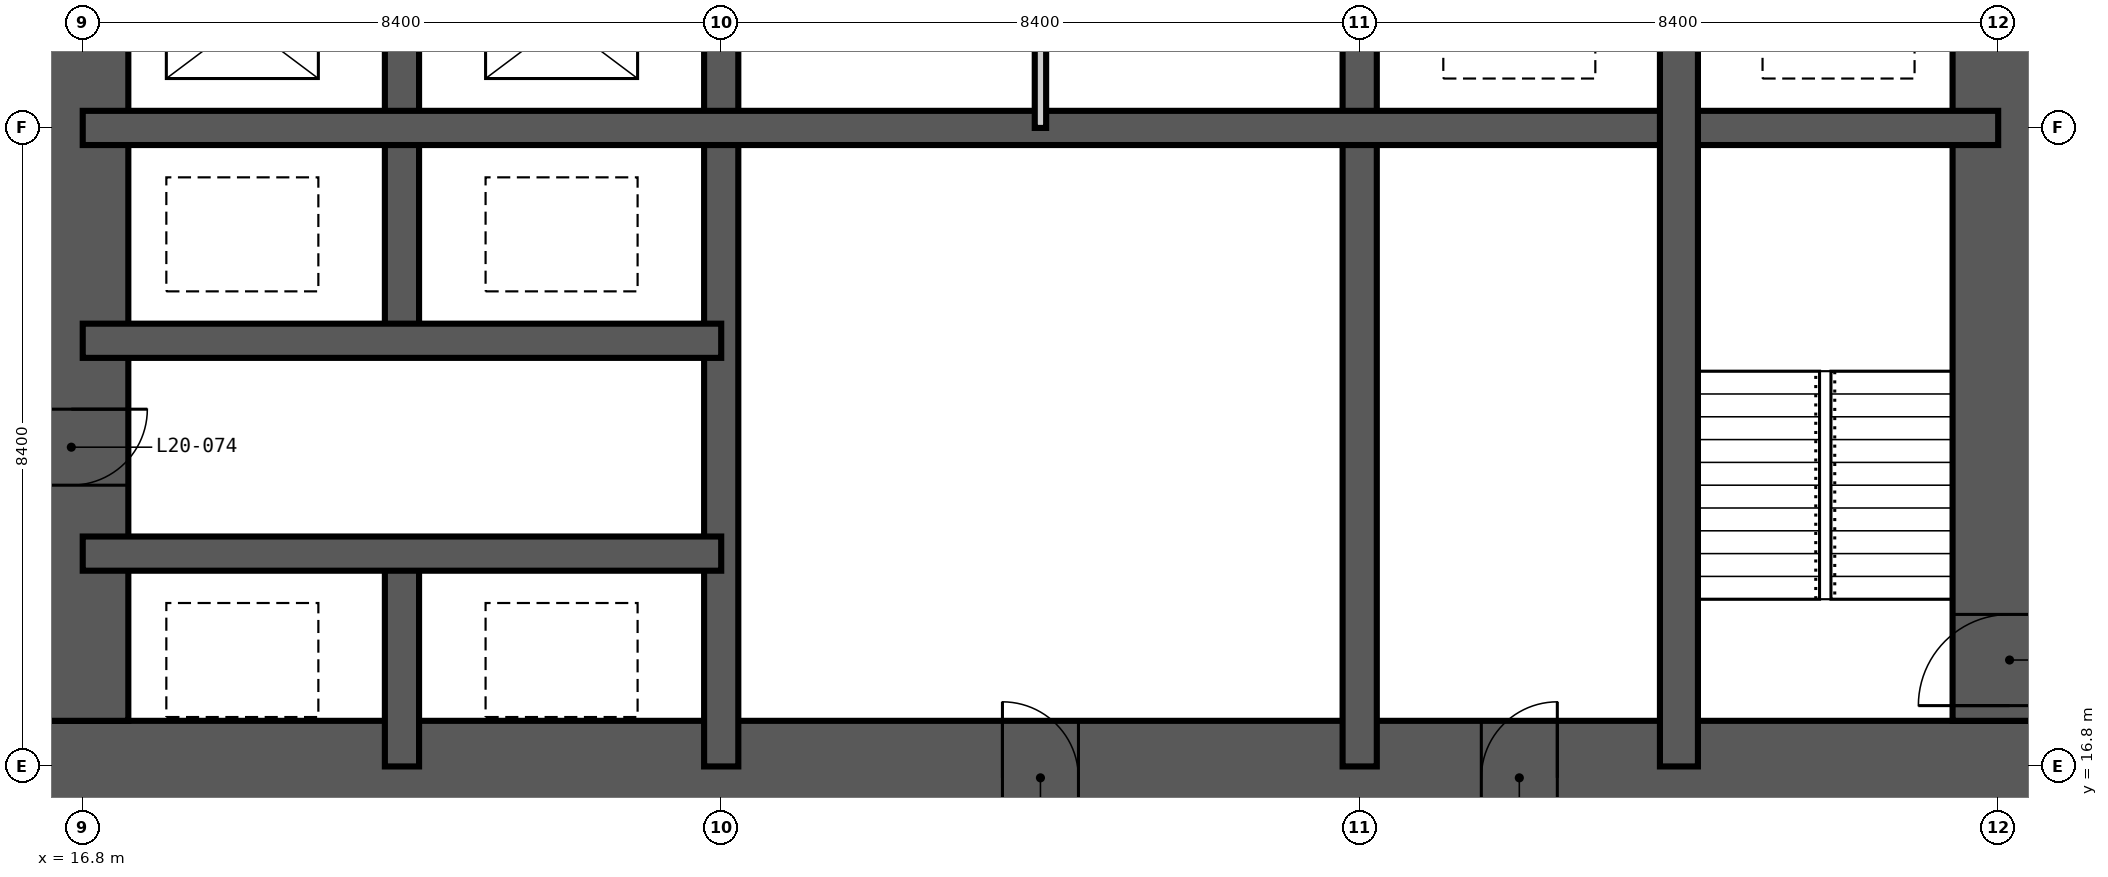
"""IFC4 building model, lengths in metres.
Left out: names, types, materials, properties, quantities, classifications, styles, units other than length and angle.
Written with IfcOpenShell. Run it as: python <this file> out.ifc"""

import sys

from ifc_helpers import new_model, si_unit, direction, frame, frame_2d, origin, place, context, subcontext, project, spatial, rectangle, extrude, element, fill, save


model = new_model("IFC4")
c1 = context("Model", 3, precision=1e-05, world=origin(), true_north=direction((0.0, 1.0)))
c2 = subcontext(c1, "Body", "Model", "MODEL_VIEW")
j1 = project(units=[si_unit("LENGTHUNIT", "METRE"), si_unit("PLANEANGLEUNIT", "RADIAN")], contexts=[c1])
p1 = place(None, origin())
s1 = spatial("IfcSite", under=j1, at=p1, CompositionType="ELEMENT")
p2 = place(p1, origin())
s2 = spatial("IfcBuilding", under=s1, at=p2, CompositionType="ELEMENT")
p3 = place(p2, frame((0.0, 0.0, 81.0)))
s3 = spatial("IfcBuildingStorey", under=s2, at=p3, CompositionType="ELEMENT", Elevation=81.0)
p4 = place(p3, frame((15.9, 16.65, -0.35), z_axis=(0.0, 0.0, 1.0), x_axis=(1.0, 0.0, 0.0)))
e1 = element("IfcWall", 1, at=p4, inside=s3, PredefinedType="SHEAR", context=c2, shape_type="SweptSolid", body=[
    extrude(rectangle(XDim=27.0, YDim=1.5, at=frame_2d((13.5, 0.0))), origin(), (0.0, 0.0, 1.0), 3.6),
])
p5 = place(p4, frame((13.0, 0.0, 0.35)))
e2 = element("IfcOpeningElement", 2, at=p5, cuts=e1, PredefinedType="OPENING", context=c2, shape_type="SweptSolid", body=[
    extrude(rectangle(XDim=1.0, YDim=2.1, at=frame_2d((0.5, 1.05))), frame((0.0, 0.76, 0.0), z_axis=(0.0, -1.0, 0.0), x_axis=(1.0, 0.0, 0.0)), (0.0, 0.0, 1.0), 1.52),
])
p6 = place(p4, frame((19.3, 0.0, 0.35)))
e3 = element("IfcOpeningElement", 3, at=p6, cuts=e1, PredefinedType="OPENING", context=c2, shape_type="SweptSolid", body=[
    extrude(rectangle(XDim=1.0, YDim=2.1, at=frame_2d((0.5, 1.05))), frame((0.0, 0.76, 0.0), z_axis=(0.0, -1.0, 0.0), x_axis=(1.0, 0.0, 0.0)), (0.0, 0.0, 1.0), 1.52),
])
p7 = place(p3, frame((42.15, 17.4, -0.35), z_axis=(0.0, 0.0, 1.0), x_axis=(0.0, 1.0, 0.0)))
e4 = element("IfcWall", 4, at=p7, inside=s3, PredefinedType="SHEAR", context=c2, shape_type="SweptSolid", body=[
    extrude(rectangle(XDim=24.0, YDim=1.5, at=frame_2d((12.0, 0.0))), origin(), (0.0, 0.0, 1.0), 3.6),
])
p8 = place(p7, frame((0.2, 0.0, 0.35)))
e5 = element("IfcOpeningElement", 5, at=p8, cuts=e4, PredefinedType="OPENING", context=c2, shape_type="SweptSolid", body=[
    extrude(rectangle(XDim=1.2, YDim=2.2, at=frame_2d((0.6, 1.1))), frame((0.0, 0.76, 0.0), z_axis=(0.0, -1.0, 0.0), x_axis=(1.0, 0.0, 0.0)), (0.0, 0.0, 1.0), 1.52),
])
p9 = place(p7, frame((11.5, 0.0, 0.35)))
e6 = element("IfcOpeningElement", 6, at=p9, cuts=e4, PredefinedType="OPENING", context=c2, shape_type="SweptSolid", body=[
    extrude(rectangle(XDim=1.0, YDim=2.1, at=frame_2d((0.5, 1.05))), frame((0.0, 0.76, 0.0), z_axis=(0.0, -1.0, 0.0), x_axis=(1.0, 0.0, 0.0)), (0.0, 0.0, 1.0), 1.52),
])
p10 = place(p7, frame((19.9, 0.0, 0.35)))
e7 = element("IfcOpeningElement", 7, at=p10, cuts=e4, PredefinedType="OPENING", context=c2, shape_type="SweptSolid", body=[
    extrude(rectangle(XDim=1.0, YDim=2.1, at=frame_2d((0.5, 1.05))), frame((0.0, 0.76, 0.0), z_axis=(0.0, -1.0, 0.0), x_axis=(1.0, 0.0, 0.0)), (0.0, 0.0, 1.0), 1.52),
])
p11 = place(p3, frame((16.65, 41.4, -0.35), z_axis=(0.0, 0.0, 1.0), x_axis=(0.0, -1.0, 0.0)))
e8 = element("IfcWall", 8, at=p11, inside=s3, PredefinedType="SHEAR", context=c2, shape_type="SweptSolid", body=[
    extrude(rectangle(XDim=24.0, YDim=1.5, at=frame_2d((12.0, 0.0))), origin(), (0.0, 0.0, 1.0), 3.6),
])
p12 = place(p11, frame((11.1, 0.0, 0.35)))
e9 = element("IfcOpeningElement", 9, at=p12, cuts=e8, PredefinedType="OPENING", context=c2, shape_type="SweptSolid", body=[
    extrude(rectangle(XDim=1.8, YDim=2.2, at=frame_2d((0.9, 1.1))), frame((0.0, 0.76, 0.0), z_axis=(0.0, -1.0, 0.0), x_axis=(1.0, 0.0, 0.0)), (0.0, 0.0, 1.0), 1.52),
])
p13 = place(p11, frame((19.9, 0.0, 0.35)))
e10 = element("IfcOpeningElement", 10, at=p13, cuts=e8, PredefinedType="OPENING", context=c2, shape_type="SweptSolid", body=[
    extrude(rectangle(XDim=1.0, YDim=2.1, at=frame_2d((0.5, 1.05))), frame((0.0, 0.76, 0.0), z_axis=(0.0, -1.0, 0.0), x_axis=(1.0, 0.0, 0.0)), (0.0, 0.0, 1.0), 1.52),
])
p14 = place(p11, frame((5.2, 0.0, 0.35)))
e11 = element("IfcOpeningElement", 11, at=p14, cuts=e8, PredefinedType="OPENING", context=c2, shape_type="SweptSolid", body=[
    extrude(rectangle(XDim=1.0, YDim=2.1, at=frame_2d((0.5, 1.05))), frame((0.0, 0.76, 0.0), z_axis=(0.0, -1.0, 0.0), x_axis=(1.0, 0.0, 0.0)), (0.0, 0.0, 1.0), 1.52),
])
p15 = place(p3, frame((21.0, 16.8, -0.35), z_axis=(0.0, 0.0, 1.0), x_axis=(0.0, 1.0, 0.0)))
e12 = element("IfcWall", 12, at=p15, inside=s3, PredefinedType="SHEAR", context=c2, shape_type="SweptSolid", body=[
    extrude(rectangle(XDim=2.8, YDim=0.45, at=frame_2d((1.4, 0.0))), origin(), (0.0, 0.0, 1.0), 3.6),
])
p16 = place(p3, frame((21.0, 22.4, -0.35), z_axis=(0.0, 0.0, 1.0), x_axis=(0.0, 1.0, 0.0)))
e13 = element("IfcWall", 13, at=p16, inside=s3, PredefinedType="SHEAR", context=c2, shape_type="SweptSolid", body=[
    extrude(rectangle(XDim=5.6, YDim=0.45, at=frame_2d((2.8, 0.0))), origin(), (0.0, 0.0, 1.0), 3.6),
])
p17 = place(p3, frame((25.2, 16.8, -0.35), z_axis=(0.0, 0.0, 1.0), x_axis=(0.0, 1.0, 0.0)))
e14 = element("IfcWall", 14, at=p17, inside=s3, PredefinedType="SHEAR", context=c2, shape_type="SweptSolid", body=[
    extrude(rectangle(XDim=25.2, YDim=0.45, at=frame_2d((12.6, 0.0))), origin(), (0.0, 0.0, 1.0), 3.6),
])
p18 = place(p3, frame((33.6, 16.8, -0.35), z_axis=(0.0, 0.0, 1.0), x_axis=(0.0, 1.0, 0.0)))
e15 = element("IfcWall", 15, at=p18, inside=s3, PredefinedType="SHEAR", context=c2, shape_type="SweptSolid", body=[
    extrude(rectangle(XDim=25.2, YDim=0.45, at=frame_2d((12.6, 0.0))), origin(), (0.0, 0.0, 1.0), 3.6),
])
p19 = place(p18, frame((22.5, 0.0, 0.35)))
e16 = element("IfcOpeningElement", 16, at=p19, cuts=e15, PredefinedType="OPENING", context=c2, shape_type="SweptSolid", body=[
    extrude(rectangle(XDim=1.2, YDim=2.2, at=frame_2d((0.6, 1.1))), frame((0.0, 0.235, 0.0), z_axis=(0.0, -1.0, 0.0), x_axis=(1.0, 0.0, 0.0)), (0.0, 0.0, 1.0), 0.47),
])
p20 = place(p18, frame((18.3, 0.0, 0.35)))
e17 = element("IfcOpeningElement", 17, at=p20, cuts=e15, PredefinedType="OPENING", context=c2, shape_type="SweptSolid", body=[
    extrude(rectangle(XDim=1.2, YDim=2.2, at=frame_2d((0.6, 1.1))), frame((0.0, 0.235, 0.0), z_axis=(0.0, -1.0, 0.0), x_axis=(1.0, 0.0, 0.0)), (0.0, 0.0, 1.0), 0.47),
])
p21 = place(p18, frame((12.1, 0.0, 0.35)))
e18 = element("IfcOpeningElement", 18, at=p21, cuts=e15, PredefinedType="OPENING", context=c2, shape_type="SweptSolid", body=[
    extrude(rectangle(XDim=1.0, YDim=2.1, at=frame_2d((0.5, 1.05))), frame((0.0, 0.235, 0.0), z_axis=(0.0, -1.0, 0.0), x_axis=(1.0, 0.0, 0.0)), (0.0, 0.0, 1.0), 0.47),
])
for number, where, z_axis, x_axis in (
    (19, (16.8, 19.6, -0.35), (0.0, 0.0, 1.0), (1.0, 0.0, 0.0)),
    (20, (16.8, 22.4, -0.35), (0.0, 0.0, 1.0), (1.0, 0.0, 0.0)),
):
    element("IfcWall", number, at=place(p3, frame(where, z_axis=z_axis, x_axis=x_axis)), inside=s3, PredefinedType="SHEAR", context=c2, shape_type="SweptSolid", body=[
        extrude(rectangle(XDim=8.4, YDim=0.45, at=frame_2d((4.2, 0.0))), origin(), (0.0, 0.0, 1.0), 3.6),
    ])
p22 = place(p3, frame((16.8, 25.2, -0.35), z_axis=(0.0, 0.0, 1.0), x_axis=(1.0, 0.0, 0.0)))
e21 = element("IfcWall", 21, at=p22, inside=s3, PredefinedType="SHEAR", context=c2, shape_type="SweptSolid", body=[
    extrude(rectangle(XDim=25.2, YDim=0.45, at=frame_2d((12.6, 0.0))), origin(), (0.0, 0.0, 1.0), 3.6),
])
p23 = place(p3, frame((37.8, 16.8, -0.35), z_axis=(0.0, 0.0, 1.0), x_axis=(0.0, 1.0, 0.0)))
e22 = element("IfcWall", 22, at=p23, inside=s3, PredefinedType="SHEAR", context=c2, shape_type="SweptSolid", body=[
    extrude(rectangle(XDim=11.2, YDim=0.5, at=frame_2d((5.6, 0.0))), origin(), (0.0, 0.0, 1.0), 3.6),
])
p24 = place(p3, frame((29.4, 25.2, 0.0), z_axis=(0.0, 0.0, 1.0), x_axis=(0.0, 1.0, 0.0)))
e23 = element("IfcWall", 23, at=p24, inside=s3, PredefinedType="PARTITIONING", context=c2, shape_type="SweptSolid", body=[
    extrude(rectangle(XDim=8.4, YDim=0.15, at=frame_2d((4.2, 0.0))), origin(), (0.0, 0.0, 1.0), 3.25),
])
p25 = place(p24, frame((3.7, 0.0, 0.0)))
e24 = element("IfcOpeningElement", 24, at=p25, cuts=e23, PredefinedType="OPENING", context=c2, shape_type="SweptSolid", body=[
    extrude(rectangle(XDim=1.0, YDim=2.1, at=frame_2d((0.5, 1.05))), frame((0.0, 0.085, 0.0), z_axis=(0.0, -1.0, 0.0), x_axis=(1.0, 0.0, 0.0)), (0.0, 0.0, 1.0), 0.17),
])
p26 = place(p8, origin())
e25 = element("IfcDoor", 25, at=p26, inside=s3, OperationType="SINGLE_SWING_LEFT", PredefinedType="DOOR", context=c2, shape_type="SweptSolid", body=[
    extrude(rectangle(XDim=1.2, YDim=2.2, at=frame_2d((0.6, 1.1))), frame((0.0, 0.025, 0.0), z_axis=(0.0, -1.0, 0.0), x_axis=(1.0, 0.0, 0.0)), (0.0, 0.0, 1.0), 0.05),
])
fill(e5, e25)
p27 = place(p13, origin())
e26 = element("IfcDoor", 26, at=p27, inside=s3, OperationType="SINGLE_SWING_LEFT", PredefinedType="DOOR", context=c2, shape_type="SweptSolid", body=[
    extrude(rectangle(XDim=1.0, YDim=2.1, at=frame_2d((0.5, 1.05))), frame((0.0, 0.025, 0.0), z_axis=(0.0, -1.0, 0.0), x_axis=(1.0, 0.0, 0.0)), (0.0, 0.0, 1.0), 0.05),
])
fill(e10, e26)
p28 = place(p5, origin())
e27 = element("IfcDoor", 27, at=p28, inside=s3, OperationType="SINGLE_SWING_LEFT", PredefinedType="DOOR", context=c2, shape_type="SweptSolid", body=[
    extrude(rectangle(XDim=1.0, YDim=2.1, at=frame_2d((0.5, 1.05))), frame((0.0, 0.025, 0.0), z_axis=(0.0, -1.0, 0.0), x_axis=(1.0, 0.0, 0.0)), (0.0, 0.0, 1.0), 0.05),
])
fill(e2, e27)
p29 = place(p6, origin())
e28 = element("IfcDoor", 28, at=p29, inside=s3, OperationType="SINGLE_SWING_RIGHT", PredefinedType="DOOR", context=c2, shape_type="SweptSolid", body=[
    extrude(rectangle(XDim=1.0, YDim=2.1, at=frame_2d((0.5, 1.05))), frame((0.0, 0.025, 0.0), z_axis=(0.0, -1.0, 0.0), x_axis=(1.0, 0.0, 0.0)), (0.0, 0.0, 1.0), 0.05),
])
fill(e3, e28)
save(model, sys.argv[1])
